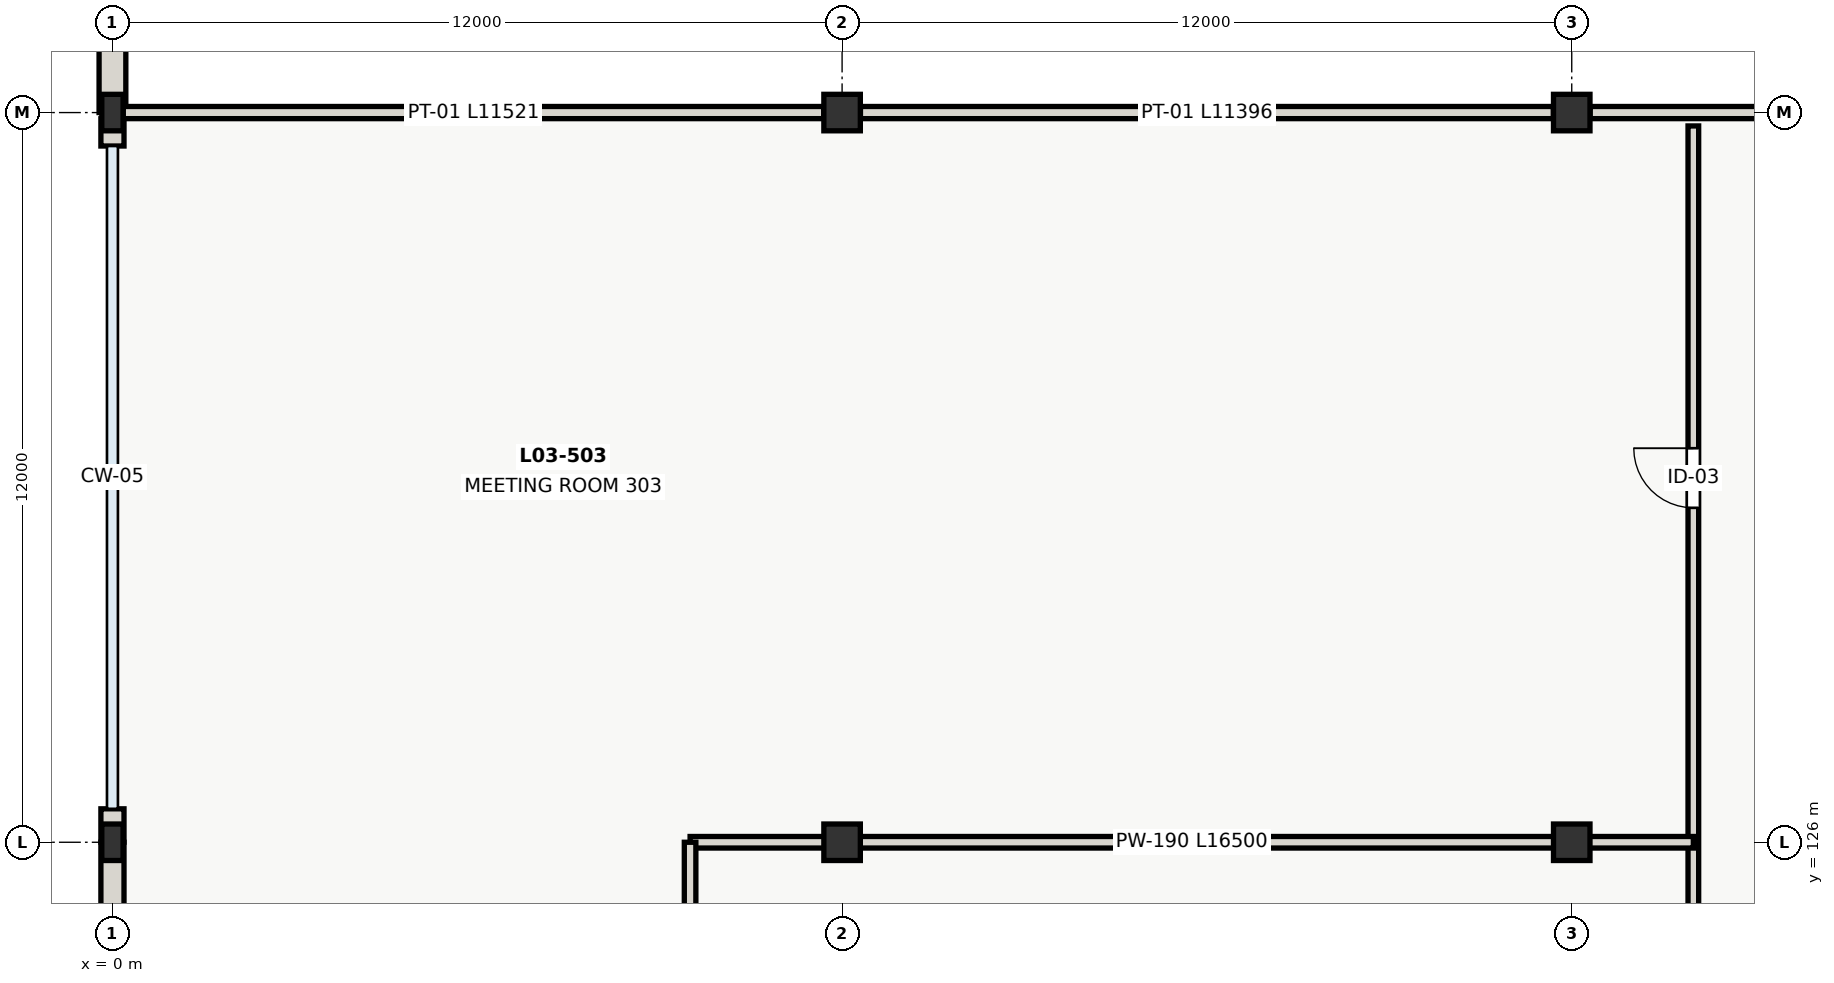
"""IFC4 building model, lengths in metres.
Left out: names, types, materials, properties, quantities, classifications, styles, units other than length and angle.
Written with IfcOpenShell. Run it as: python <this file> out.ifc"""

import sys

from ifc_helpers import new_model, si_unit, direction, frame, frame_2d, origin, origin_2d, place, context, subcontext, project, spatial, rectangle, extrude, element, fill, save


model = new_model("IFC4")
c1 = context("Model", 3, precision=1e-05, world=origin(), true_north=direction((0.0, 1.0)))
c2 = subcontext(c1, "Body", "Model", "MODEL_VIEW")
j1 = project(units=[si_unit("LENGTHUNIT", "METRE"), si_unit("PLANEANGLEUNIT", "RADIAN")], contexts=[c1])
p1 = place(None, origin())
s1 = spatial("IfcSite", under=j1, at=p1, CompositionType="ELEMENT")
p2 = place(p1, origin())
s2 = spatial("IfcBuilding", under=s1, at=p2, CompositionType="ELEMENT")
p3 = place(p2, frame((0.0, 0.0, 8.4)))
s3 = spatial("IfcBuildingStorey", under=s2, at=p3, CompositionType="ELEMENT", Elevation=8.4)
p4 = place(p3, frame((0.0, 126.0, 0.0), z_axis=(0.0, 0.0, 1.0), x_axis=(1.0, 0.0, 0.0)))
e1 = element("IfcColumn", 1, at=p4, inside=s3, PredefinedType="PILASTER", context=c2, shape_type="SweptSolid", body=[
    extrude(rectangle(XDim=0.35, YDim=0.6, at=origin_2d()), origin(), (0.0, 0.0, 1.0), 4.2),
])
for number, where, z_axis, x_axis in (
    (2, (12.0, 126.0, 0.0), (0.0, 0.0, 1.0), (1.0, 0.0, 0.0)),
    (3, (24.0, 126.0, 0.0), (0.0, 0.0, 1.0), (1.0, 0.0, 0.0)),
):
    element("IfcColumn", number, at=place(p3, frame(where, z_axis=z_axis, x_axis=x_axis)), inside=s3, PredefinedType="COLUMN", context=c2, shape_type="SweptSolid", body=[
        extrude(rectangle(XDim=0.6, YDim=0.6, at=origin_2d()), origin(), (0.0, 0.0, 1.0), 4.2),
    ])
p5 = place(p3, frame((0.0, 138.0, 0.0), z_axis=(0.0, 0.0, 1.0), x_axis=(1.0, 0.0, 0.0)))
e4 = element("IfcColumn", 4, at=p5, inside=s3, PredefinedType="PILASTER", context=c2, shape_type="SweptSolid", body=[
    extrude(rectangle(XDim=0.35, YDim=0.6, at=origin_2d()), origin(), (0.0, 0.0, 1.0), 4.2),
])
for number, where, z_axis, x_axis in (
    (5, (12.0, 138.0, 0.0), (0.0, 0.0, 1.0), (1.0, 0.0, 0.0)),
    (6, (24.0, 138.0, 0.0), (0.0, 0.0, 1.0), (1.0, 0.0, 0.0)),
):
    element("IfcColumn", number, at=place(p3, frame(where, z_axis=z_axis, x_axis=x_axis)), inside=s3, PredefinedType="COLUMN", context=c2, shape_type="SweptSolid", body=[
        extrude(rectangle(XDim=0.6, YDim=0.6, at=origin_2d()), origin(), (0.0, 0.0, 1.0), 4.2),
    ])
p6 = place(p3, frame((0.0, 120.0, 0.0), z_axis=(0.0, 0.0, 1.0), x_axis=(0.0, 1.0, 0.0)))
e7 = element("IfcWall", 7, at=p6, inside=s3, PredefinedType="SOLIDWALL", context=c2, shape_type="SweptSolid", body=[
    extrude(rectangle(XDim=6.0, YDim=0.38, at=frame_2d((3.0, 0.0))), origin(), (0.0, 0.0, 1.0), 3.57),
])
p7 = place(p6, frame((2.25, 0.0, 0.9)))
e8 = element("IfcOpeningElement", 8, at=p7, cuts=e7, PredefinedType="OPENING", context=c2, shape_type="SweptSolid", body=[
    extrude(rectangle(XDim=1.5, YDim=1.95, at=frame_2d((0.75, 0.975))), frame((0.0, 0.2, 0.0), z_axis=(0.0, -1.0, 0.0), x_axis=(1.0, 0.0, 0.0)), (0.0, 0.0, 1.0), 0.4),
])
p8 = place(p3, frame((0.0, 126.002, 0.0), z_axis=(0.0, 0.0, 1.0), x_axis=(0.0, 1.0, 0.0)))
e9 = element("IfcWall", 9, at=p8, inside=s3, PredefinedType="SOLIDWALL", context=c2, shape_type="SweptSolid", body=[
    extrude(rectangle(XDim=0.548, YDim=0.38, at=frame_2d((0.274, 0.0))), origin(), (0.0, 0.0, 1.0), 3.5),
])
p9 = place(p3, frame((0.0, 137.45, 0.0), z_axis=(0.0, 0.0, 1.0), x_axis=(0.0, 1.0, 0.0)))
e10 = element("IfcWall", 10, at=p9, inside=s3, PredefinedType="SOLIDWALL", context=c2, shape_type="SweptSolid", body=[
    extrude(rectangle(XDim=0.448, YDim=0.38, at=frame_2d((0.224, 0.0))), origin(), (0.0, 0.0, 1.0), 3.5),
])
p10 = place(p3, frame((0.0, 138.0, 0.0), z_axis=(0.0, 0.0, 1.0), x_axis=(0.0, 1.0, 0.0)))
e11 = element("IfcWall", 11, at=p10, inside=s3, PredefinedType="SHEAR", context=c2, shape_type="SweptSolid", body=[
    extrude(rectangle(XDim=12.0, YDim=0.44, at=frame_2d((6.0, 0.0))), origin(), (0.0, 0.0, 1.0), 5.65),
])
p11 = place(p10, frame((2.7, 0.0, 1.8)))
e12 = element("IfcOpeningElement", 12, at=p11, cuts=e11, PredefinedType="OPENING", context=c2, shape_type="SweptSolid", body=[
    extrude(rectangle(XDim=1.8, YDim=1.05, at=frame_2d((0.9, 0.525))), frame((0.0, 0.23, 0.0), z_axis=(0.0, -1.0, 0.0), x_axis=(1.0, 0.0, 0.0)), (0.0, 0.0, 1.0), 0.46),
])
p12 = place(p10, frame((7.5, 0.0, 1.8)))
e13 = element("IfcOpeningElement", 13, at=p12, cuts=e11, PredefinedType="OPENING", context=c2, shape_type="SweptSolid", body=[
    extrude(rectangle(XDim=1.8, YDim=1.05, at=frame_2d((0.9, 0.525))), frame((0.0, 0.23, 0.0), z_axis=(0.0, -1.0, 0.0), x_axis=(1.0, 0.0, 0.0)), (0.0, 0.0, 1.0), 0.46),
])
p13 = place(p3, frame((0.177, 138.0, 0.0), z_axis=(0.0, 0.0, 1.0), x_axis=(1.0, 0.0, 0.0)))
e14 = element("IfcWall", 14, at=p13, inside=s3, PredefinedType="PARTITIONING", context=c2, shape_type="SweptSolid", body=[
    extrude(rectangle(XDim=11.521, YDim=0.2, at=frame_2d((5.76, 0.0))), origin(), (0.0, 0.0, 1.0), 3.57),
])
for number, where, z_axis, x_axis in (
    (15, (12.302, 138.0, 0.0), (0.0, 0.0, 1.0), (1.0, 0.0, 0.0)),
    (16, (24.302, 138.0, 0.0), (0.0, 0.0, 1.0), (1.0, 0.0, 0.0)),
):
    element("IfcWall", number, at=place(p3, frame(where, z_axis=z_axis, x_axis=x_axis)), inside=s3, PredefinedType="PARTITIONING", context=c2, shape_type="SweptSolid", body=[
        extrude(rectangle(XDim=11.396, YDim=0.2, at=frame_2d((5.698, 0.0))), origin(), (0.0, 0.0, 1.0), 3.57),
    ])
p14 = place(p3, frame((26.0, 84.22, 0.0), z_axis=(0.0, 0.0, 1.0), x_axis=(0.0, 1.0, 0.0)))
e17 = element("IfcWall", 17, at=p14, inside=s3, PredefinedType="PARTITIONING", context=c2, shape_type="SweptSolid", body=[
    extrude(rectangle(XDim=53.56, YDim=0.175, at=frame_2d((26.78, 0.0))), origin(), (0.0, 0.0, 1.0), 3.75),
])
p15 = place(p14, frame((1.98, 0.0, 0.0)))
e18 = element("IfcOpeningElement", 18, at=p15, cuts=e17, PredefinedType="OPENING", context=c2, shape_type="SweptSolid", body=[
    extrude(rectangle(XDim=1.05, YDim=2.1, at=frame_2d((0.525, 1.05))), frame((0.0, 0.097, 0.0), z_axis=(0.0, -1.0, 0.0), x_axis=(1.0, 0.0, 0.0)), (0.0, 0.0, 1.0), 0.195),
])
p16 = place(p14, frame((10.28, 0.0, 0.0)))
e19 = element("IfcOpeningElement", 19, at=p16, cuts=e17, PredefinedType="OPENING", context=c2, shape_type="SweptSolid", body=[
    extrude(rectangle(XDim=1.8, YDim=2.15, at=frame_2d((0.9, 1.075))), frame((0.0, 0.097, 0.0), z_axis=(0.0, -1.0, 0.0), x_axis=(1.0, 0.0, 0.0)), (0.0, 0.0, 1.0), 0.195),
])
p17 = place(p14, frame((14.58, 0.0, 0.0)))
e20 = element("IfcOpeningElement", 20, at=p17, cuts=e17, PredefinedType="OPENING", context=c2, shape_type="SweptSolid", body=[
    extrude(rectangle(XDim=1.05, YDim=2.1, at=frame_2d((0.525, 1.05))), frame((0.0, 0.097, 0.0), z_axis=(0.0, -1.0, 0.0), x_axis=(1.0, 0.0, 0.0)), (0.0, 0.0, 1.0), 0.195),
])
p18 = place(p14, frame((25.78, 0.0, 0.0)))
e21 = element("IfcOpeningElement", 21, at=p18, cuts=e17, PredefinedType="OPENING", context=c2, shape_type="SweptSolid", body=[
    extrude(rectangle(XDim=1.05, YDim=2.1, at=frame_2d((0.525, 1.05))), frame((0.0, 0.097, 0.0), z_axis=(0.0, -1.0, 0.0), x_axis=(1.0, 0.0, 0.0)), (0.0, 0.0, 1.0), 0.195),
])
p19 = place(p14, frame((37.98, 0.0, 0.0)))
e22 = element("IfcOpeningElement", 22, at=p19, cuts=e17, PredefinedType="OPENING", context=c2, shape_type="SweptSolid", body=[
    extrude(rectangle(XDim=1.0, YDim=2.1, at=frame_2d((0.5, 1.05))), frame((0.0, 0.097, 0.0), z_axis=(0.0, -1.0, 0.0), x_axis=(1.0, 0.0, 0.0)), (0.0, 0.0, 1.0), 0.195),
])
p20 = place(p14, frame((47.28, 0.0, 0.0)))
e23 = element("IfcOpeningElement", 23, at=p20, cuts=e17, PredefinedType="OPENING", context=c2, shape_type="SweptSolid", body=[
    extrude(rectangle(XDim=0.98, YDim=2.1, at=frame_2d((0.49, 1.05))), frame((0.0, 0.097, 0.0), z_axis=(0.0, -1.0, 0.0), x_axis=(1.0, 0.0, 0.0)), (0.0, 0.0, 1.0), 0.195),
])
p21 = place(p3, frame((9.5, 126.0, 0.0), z_axis=(0.0, 0.0, 1.0), x_axis=(1.0, 0.0, 0.0)))
e24 = element("IfcWall", 24, at=p21, inside=s3, PredefinedType="PLUMBINGWALL", context=c2, shape_type="SweptSolid", body=[
    extrude(rectangle(XDim=16.5, YDim=0.19, at=frame_2d((8.25, 0.0))), origin(), (0.0, 0.0, 1.0), 3.42),
])
p22 = place(p3, frame((9.5, 120.0, 0.0), z_axis=(0.0, 0.0, 1.0), x_axis=(0.0, 1.0, 0.0)))
e25 = element("IfcWall", 25, at=p22, inside=s3, PredefinedType="PLUMBINGWALL", context=c2, shape_type="SweptSolid", body=[
    extrude(rectangle(XDim=6.0, YDim=0.19, at=frame_2d((3.0, 0.0))), origin(), (0.0, 0.0, 1.0), 3.75),
])
p23 = place(p20, origin())
e26 = element("IfcDoor", 26, at=p23, inside=s3, OperationType="SINGLE_SWING_RIGHT", PredefinedType="DOOR", context=c2, shape_type="SweptSolid", body=[
    extrude(rectangle(XDim=0.98, YDim=2.1, at=frame_2d((0.49, 1.05))), frame((0.0, 0.025, 0.0), z_axis=(0.0, -1.0, 0.0), x_axis=(1.0, 0.0, 0.0)), (0.0, 0.0, 1.0), 0.05),
])
fill(e23, e26)
save(model, sys.argv[1])
